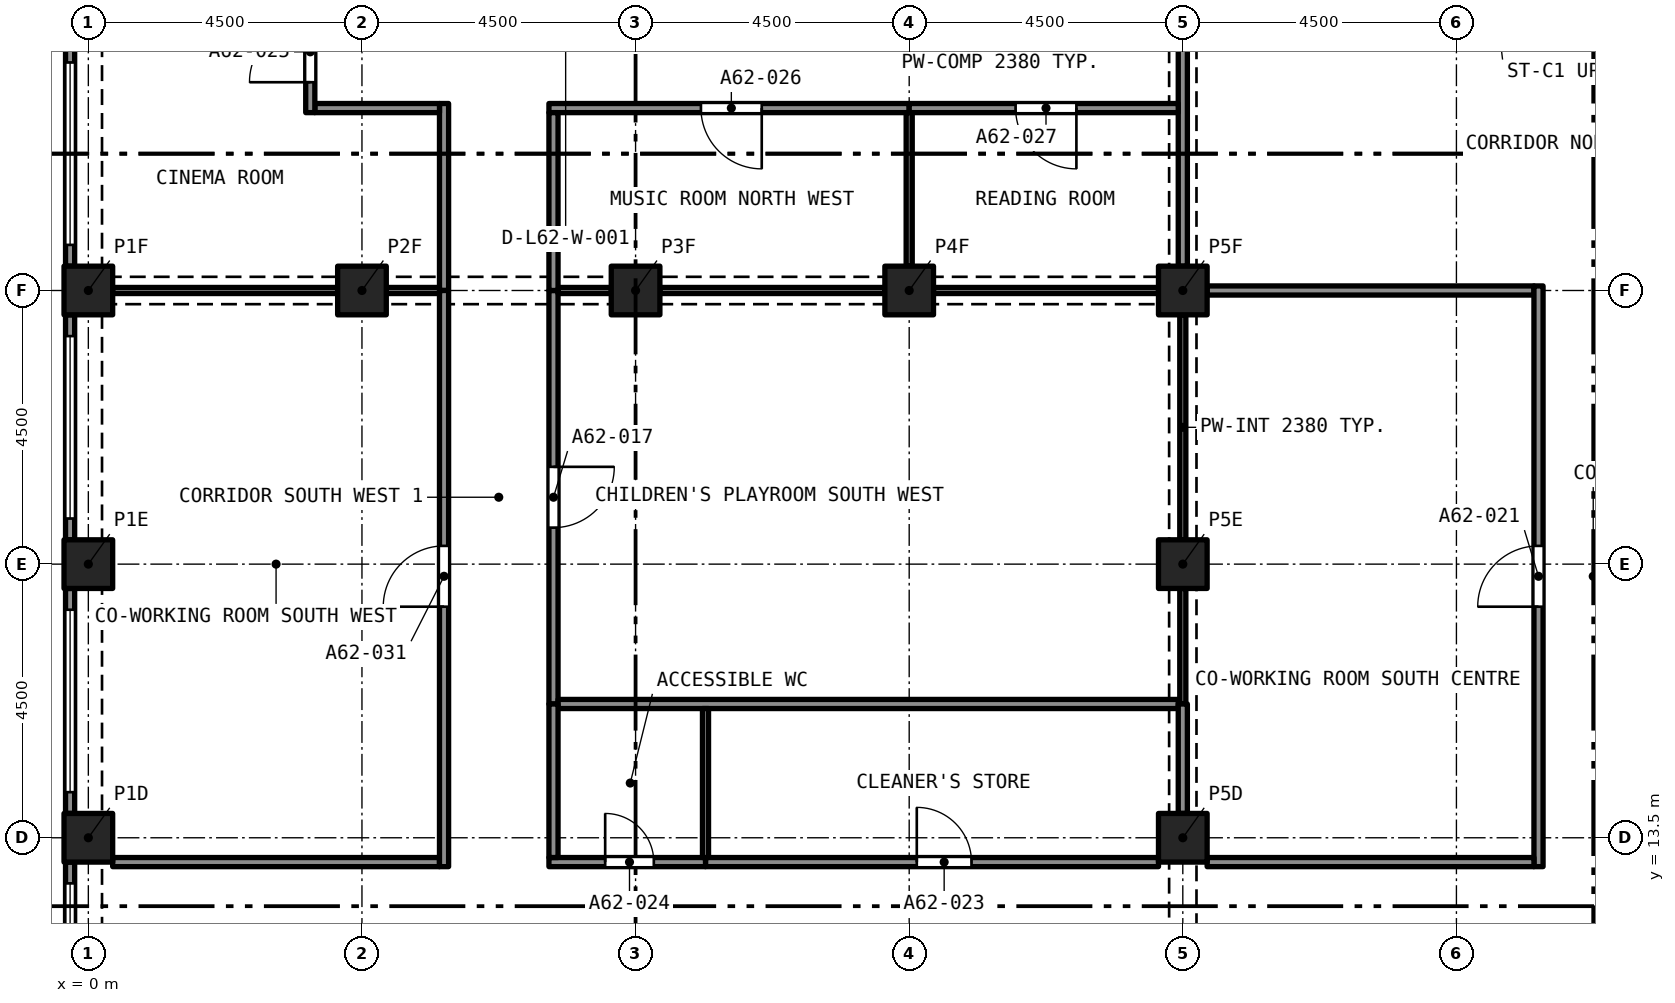
"""IFC4 building model, lengths in metres.
Left out: names, types, materials, properties, quantities, classifications, styles, units other than length and angle.
Written with IfcOpenShell. Run it as: python <this file> out.ifc"""

import sys

from ifc_helpers import new_model, si_unit, direction, frame, frame_2d, origin, origin_2d, place, context, subcontext, project, spatial, rectangle, extrude, element, fill, save


model = new_model("IFC4")
c1 = context("Model", 3, precision=1e-05, world=origin(), true_north=direction((0.0, 1.0)))
c2 = subcontext(c1, "Body", "Model", "MODEL_VIEW")
j1 = project(units=[si_unit("LENGTHUNIT", "METRE"), si_unit("PLANEANGLEUNIT", "RADIAN")], contexts=[c1])
p1 = place(None, origin())
s1 = spatial("IfcSite", under=j1, at=p1, CompositionType="ELEMENT")
p2 = place(p1, origin())
s2 = spatial("IfcBuilding", under=s1, at=p2, CompositionType="ELEMENT")
p3 = place(p2, frame((0.0, 0.0, 222.895)))
s3 = spatial("IfcBuildingStorey", under=s2, at=p3, CompositionType="ELEMENT", Elevation=222.895)
for number, where, z_axis, x_axis in (
    (1, (0.0, 13.5, 0.0), (0.0, 0.0, 1.0), (1.0, 0.0, 0.0)),
    (2, (18.0, 13.5, 0.0), (0.0, 0.0, 1.0), (1.0, 0.0, 0.0)),
    (3, (0.0, 18.0, 0.0), (0.0, 0.0, 1.0), (1.0, 0.0, 0.0)),
    (4, (18.0, 18.0, 0.0), (0.0, 0.0, 1.0), (1.0, 0.0, 0.0)),
    (5, (0.0, 22.5, 0.0), (0.0, 0.0, 1.0), (1.0, 0.0, 0.0)),
    (6, (4.5, 22.5, 0.0), (0.0, 0.0, 1.0), (1.0, 0.0, 0.0)),
    (7, (9.0, 22.5, 0.0), (0.0, 0.0, 1.0), (1.0, 0.0, 0.0)),
    (8, (13.5, 22.5, 0.0), (0.0, 0.0, 1.0), (1.0, 0.0, 0.0)),
    (9, (18.0, 22.5, 0.0), (0.0, 0.0, 1.0), (1.0, 0.0, 0.0)),
):
    element("IfcColumn", number, at=place(p3, frame(where, z_axis=z_axis, x_axis=x_axis)), inside=s3, PredefinedType="COLUMN", context=c2, shape_type="SweptSolid", body=[
        extrude(rectangle(XDim=0.8, YDim=0.8, at=origin_2d()), origin(), (0.0, 0.0, 1.0), 3.2),
    ])
p4 = place(p3, frame((-0.3, 22.9, 0.0), z_axis=(0.0, 0.0, 1.0), x_axis=(0.0, 1.0, 0.0)))
e10 = element("IfcWall", 10, at=p4, inside=s3, PredefinedType="SOLIDWALL", context=c2, shape_type="SweptSolid", body=[
    extrude(rectangle(XDim=3.7, YDim=0.15, at=frame_2d((1.85, 0.0))), origin(), (0.0, 0.0, 1.0), 3.2),
])
p5 = place(p4, frame((0.35, 0.0, 0.45)))
e11 = element("IfcOpeningElement", 11, at=p5, cuts=e10, PredefinedType="OPENING", context=c2, shape_type="SweptSolid", body=[
    extrude(rectangle(XDim=3.0, YDim=1.95, at=frame_2d((1.5, 0.975))), frame((0.0, 0.085, 0.0), z_axis=(0.0, -1.0, 0.0), x_axis=(1.0, 0.0, 0.0)), (0.0, 0.0, 1.0), 0.17),
])
p6 = place(p3, frame((-0.3, 18.4, 0.0), z_axis=(0.0, 0.0, 1.0), x_axis=(0.0, 1.0, 0.0)))
e12 = element("IfcWall", 12, at=p6, inside=s3, PredefinedType="SOLIDWALL", context=c2, shape_type="SweptSolid", body=[
    extrude(rectangle(XDim=3.7, YDim=0.15, at=frame_2d((1.85, 0.0))), origin(), (0.0, 0.0, 1.0), 3.2),
])
p7 = place(p6, frame((0.35, 0.0, 0.45)))
e13 = element("IfcOpeningElement", 13, at=p7, cuts=e12, PredefinedType="OPENING", context=c2, shape_type="SweptSolid", body=[
    extrude(rectangle(XDim=3.0, YDim=1.95, at=frame_2d((1.5, 0.975))), frame((0.0, 0.085, 0.0), z_axis=(0.0, -1.0, 0.0), x_axis=(1.0, 0.0, 0.0)), (0.0, 0.0, 1.0), 0.17),
])
p8 = place(p3, frame((-0.3, 13.9, 0.0), z_axis=(0.0, 0.0, 1.0), x_axis=(0.0, 1.0, 0.0)))
e14 = element("IfcWall", 14, at=p8, inside=s3, PredefinedType="SOLIDWALL", context=c2, shape_type="SweptSolid", body=[
    extrude(rectangle(XDim=3.7, YDim=0.15, at=frame_2d((1.85, 0.0))), origin(), (0.0, 0.0, 1.0), 3.2),
])
p9 = place(p8, frame((0.35, 0.0, 0.45)))
e15 = element("IfcOpeningElement", 15, at=p9, cuts=e14, PredefinedType="OPENING", context=c2, shape_type="SweptSolid", body=[
    extrude(rectangle(XDim=3.0, YDim=1.95, at=frame_2d((1.5, 0.975))), frame((0.0, 0.085, 0.0), z_axis=(0.0, -1.0, 0.0), x_axis=(1.0, 0.0, 0.0)), (0.0, 0.0, 1.0), 0.17),
])
p10 = place(p3, frame((-0.3, 9.4, 0.0), z_axis=(0.0, 0.0, 1.0), x_axis=(0.0, 1.0, 0.0)))
e16 = element("IfcWall", 16, at=p10, inside=s3, PredefinedType="SOLIDWALL", context=c2, shape_type="SweptSolid", body=[
    extrude(rectangle(XDim=3.7, YDim=0.15, at=frame_2d((1.85, 0.0))), origin(), (0.0, 0.0, 1.0), 3.2),
])
p11 = place(p10, frame((0.35, 0.0, 0.45)))
e17 = element("IfcOpeningElement", 17, at=p11, cuts=e16, PredefinedType="OPENING", context=c2, shape_type="SweptSolid", body=[
    extrude(rectangle(XDim=3.0, YDim=1.95, at=frame_2d((1.5, 0.975))), frame((0.0, 0.085, 0.0), z_axis=(0.0, -1.0, 0.0), x_axis=(1.0, 0.0, 0.0)), (0.0, 0.0, 1.0), 0.17),
])
p12 = place(p3, frame((18.0, 18.4, 0.0), z_axis=(0.0, 0.0, 1.0), x_axis=(0.0, 1.0, 0.0)))
e18 = element("IfcWall", 18, at=p12, inside=s3, PredefinedType="PARTITIONING", context=c2, shape_type="SweptSolid", body=[
    extrude(rectangle(XDim=3.7, YDim=0.1, at=frame_2d((1.85, 0.0))), origin(), (0.0, 0.0, 1.0), 2.38),
])
p13 = place(p3, frame((18.0, 15.7, 0.0), z_axis=(0.0, 0.0, 1.0), x_axis=(0.0, 1.0, 0.0)))
e19 = element("IfcWall", 19, at=p13, inside=s3, PredefinedType="PARTITIONING", context=c2, shape_type="SweptSolid", body=[
    extrude(rectangle(XDim=1.9, YDim=0.1, at=frame_2d((0.95, 0.0))), origin(), (0.0, 0.0, 1.0), 2.38),
])
p14 = place(p3, frame((7.65, 22.5, 0.0), z_axis=(0.0, 0.0, 1.0), x_axis=(0.0, -1.0, 0.0)))
e20 = element("IfcWall", 20, at=p14, inside=s3, PredefinedType="PARTITIONING", context=c2, shape_type="SweptSolid", body=[
    extrude(rectangle(XDim=6.8, YDim=0.15, at=frame_2d((3.4, 0.0))), origin(), (0.0, 0.0, 1.0), 2.9),
])
p15 = place(p14, frame((2.9, 0.0, 0.0)))
e21 = element("IfcOpeningElement", 21, at=p15, cuts=e20, PredefinedType="OPENING", context=c2, shape_type="SweptSolid", body=[
    extrude(rectangle(XDim=1.0, YDim=2.1, at=frame_2d((0.5, 1.05))), frame((0.0, 0.085, 0.0), z_axis=(0.0, -1.0, 0.0), x_axis=(1.0, 0.0, 0.0)), (0.0, 0.0, 1.0), 0.17),
])
p16 = place(p3, frame((7.725, 22.5, 0.0), z_axis=(0.0, 0.0, 1.0), x_axis=(1.0, 0.0, 0.0)))
e22 = element("IfcWall", 22, at=p16, inside=s3, PredefinedType="PARTITIONING", context=c2, shape_type="SweptSolid", body=[
    extrude(rectangle(XDim=0.875, YDim=0.1, at=frame_2d((0.438, 0.0))), origin(), (0.0, 0.0, 1.0), 2.38),
])
for number, where, z_axis, x_axis in (
    (23, (9.4, 22.5, 0.0), (0.0, 0.0, 1.0), (1.0, 0.0, 0.0)),
    (24, (13.9, 22.5, 0.0), (0.0, 0.0, 1.0), (1.0, 0.0, 0.0)),
):
    element("IfcWall", number, at=place(p3, frame(where, z_axis=z_axis, x_axis=x_axis)), inside=s3, PredefinedType="PARTITIONING", context=c2, shape_type="SweptSolid", body=[
        extrude(rectangle(XDim=3.7, YDim=0.1, at=frame_2d((1.85, 0.0))), origin(), (0.0, 0.0, 1.0), 2.38),
    ])
p17 = place(p3, frame((7.725, 15.7, 0.0), z_axis=(0.0, 0.0, 1.0), x_axis=(1.0, 0.0, 0.0)))
e25 = element("IfcWall", 25, at=p17, inside=s3, PredefinedType="PARTITIONING", context=c2, shape_type="SweptSolid", body=[
    extrude(rectangle(XDim=10.2, YDim=0.15, at=frame_2d((5.1, 0.0))), origin(), (0.0, 0.0, 1.0), 2.9),
])
p18 = place(p3, frame((18.4, 22.5, 0.0), z_axis=(0.0, 0.0, 1.0), x_axis=(1.0, 0.0, 0.0)))
e26 = element("IfcWall", 26, at=p18, inside=s3, PredefinedType="PARTITIONING", context=c2, shape_type="SweptSolid", body=[
    extrude(rectangle(XDim=5.375, YDim=0.15, at=frame_2d((2.688, 0.0))), origin(), (0.0, 0.0, 1.0), 2.75),
])
p19 = place(p3, frame((18.0, 22.9, 0.0), z_axis=(0.0, 0.0, 1.0), x_axis=(0.0, 1.0, 0.0)))
e27 = element("IfcWall", 27, at=p19, inside=s3, PredefinedType="PARTITIONING", context=c2, shape_type="SweptSolid", body=[
    extrude(rectangle(XDim=3.7, YDim=0.15, at=frame_2d((1.85, 0.0))), origin(), (0.0, 0.0, 1.0), 2.38),
])
p20 = place(p3, frame((23.85, 13.025, 0.0), z_axis=(0.0, 0.0, 1.0), x_axis=(0.0, 1.0, 0.0)))
e28 = element("IfcWall", 28, at=p20, inside=s3, PredefinedType="PARTITIONING", context=c2, shape_type="SweptSolid", body=[
    extrude(rectangle(XDim=9.55, YDim=0.15, at=frame_2d((4.775, 0.0))), origin(), (0.0, 0.0, 1.0), 2.75),
])
p21 = place(p20, frame((4.275, 0.0, 0.0)))
e29 = element("IfcOpeningElement", 29, at=p21, cuts=e28, PredefinedType="OPENING", context=c2, shape_type="SweptSolid", body=[
    extrude(rectangle(XDim=1.0, YDim=2.1, at=frame_2d((0.5, 1.05))), frame((0.0, 0.085, 0.0), z_axis=(0.0, -1.0, 0.0), x_axis=(1.0, 0.0, 0.0)), (0.0, 0.0, 1.0), 0.17),
])
p22 = place(p3, frame((18.4, 13.1, 0.0), z_axis=(0.0, 0.0, 1.0), x_axis=(1.0, 0.0, 0.0)))
e30 = element("IfcWall", 30, at=p22, inside=s3, PredefinedType="PARTITIONING", context=c2, shape_type="SweptSolid", body=[
    extrude(rectangle(XDim=5.375, YDim=0.15, at=frame_2d((2.688, 0.0))), origin(), (0.0, 0.0, 1.0), 2.75),
])
p23 = place(p3, frame((10.15, 13.1, 0.0), z_axis=(0.0, 0.0, 1.0), x_axis=(1.0, 0.0, 0.0)))
e31 = element("IfcWall", 31, at=p23, inside=s3, PredefinedType="PARTITIONING", context=c2, shape_type="SweptSolid", body=[
    extrude(rectangle(XDim=7.45, YDim=0.15, at=frame_2d((3.725, 0.0))), origin(), (0.0, 0.0, 1.0), 2.9),
])
p24 = place(p23, frame((3.475, 0.0, 0.0)))
e32 = element("IfcOpeningElement", 32, at=p24, cuts=e31, PredefinedType="OPENING", context=c2, shape_type="SweptSolid", body=[
    extrude(rectangle(XDim=0.9, YDim=2.1, at=frame_2d((0.45, 1.05))), frame((0.0, 0.085, 0.0), z_axis=(0.0, -1.0, 0.0), x_axis=(1.0, 0.0, 0.0)), (0.0, 0.0, 1.0), 0.17),
])
p25 = place(p3, frame((7.575, 13.1, 0.0), z_axis=(0.0, 0.0, 1.0), x_axis=(1.0, 0.0, 0.0)))
e33 = element("IfcWall", 33, at=p25, inside=s3, PredefinedType="PARTITIONING", context=c2, shape_type="SweptSolid", body=[
    extrude(rectangle(XDim=2.575, YDim=0.15, at=frame_2d((1.288, 0.0))), origin(), (0.0, 0.0, 1.0), 2.9),
])
p26 = place(p25, frame((0.925, 0.0, 0.0)))
e34 = element("IfcOpeningElement", 34, at=p26, cuts=e33, PredefinedType="OPENING", context=c2, shape_type="SweptSolid", body=[
    extrude(rectangle(XDim=0.8, YDim=2.1, at=frame_2d((0.4, 1.05))), frame((0.0, 0.085, 0.0), z_axis=(0.0, -1.0, 0.0), x_axis=(1.0, 0.0, 0.0)), (0.0, 0.0, 1.0), 0.17),
])
p27 = place(p3, frame((0.4, 13.1, 0.0), z_axis=(0.0, 0.0, 1.0), x_axis=(1.0, 0.0, 0.0)))
e35 = element("IfcWall", 35, at=p27, inside=s3, PredefinedType="PARTITIONING", context=c2, shape_type="SweptSolid", body=[
    extrude(rectangle(XDim=5.375, YDim=0.15, at=frame_2d((2.688, 0.0))), origin(), (0.0, 0.0, 1.0), 2.9),
])
p28 = place(p3, frame((18.0, 13.9, 0.0), z_axis=(0.0, 0.0, 1.0), x_axis=(0.0, 1.0, 0.0)))
e36 = element("IfcWall", 36, at=p28, inside=s3, PredefinedType="PARTITIONING", context=c2, shape_type="SweptSolid", body=[
    extrude(rectangle(XDim=1.8, YDim=0.15, at=frame_2d((0.9, 0.0))), origin(), (0.0, 0.0, 1.0), 2.38),
])
p29 = place(p3, frame((5.85, 22.5, 0.0), z_axis=(0.0, 0.0, 1.0), x_axis=(0.0, 1.0, 0.0)))
e37 = element("IfcWall", 37, at=p29, inside=s3, PredefinedType="PARTITIONING", context=c2, shape_type="SweptSolid", body=[
    extrude(rectangle(XDim=3.075, YDim=0.15, at=frame_2d((1.538, 0.0))), origin(), (0.0, 0.0, 1.0), 2.9),
])
p30 = place(p3, frame((3.725, 25.5, 0.0), z_axis=(0.0, 0.0, 1.0), x_axis=(1.0, 0.0, 0.0)))
e38 = element("IfcWall", 38, at=p30, inside=s3, PredefinedType="PARTITIONING", context=c2, shape_type="SweptSolid", body=[
    extrude(rectangle(XDim=2.05, YDim=0.15, at=frame_2d((1.025, 0.0))), origin(), (0.0, 0.0, 1.0), 2.9),
])
p31 = place(p3, frame((3.65, 25.425, 0.0), z_axis=(0.0, 0.0, 1.0), x_axis=(0.0, 1.0, 0.0)))
e39 = element("IfcWall", 39, at=p31, inside=s3, PredefinedType="PARTITIONING", context=c2, shape_type="SweptSolid", body=[
    extrude(rectangle(XDim=1.925, YDim=0.15, at=frame_2d((0.962, 0.0))), origin(), (0.0, 0.0, 1.0), 2.9),
])
p32 = place(p31, frame((0.5, 0.0, 0.0)))
e40 = element("IfcOpeningElement", 40, at=p32, cuts=e39, PredefinedType="OPENING", context=c2, shape_type="SweptSolid", body=[
    extrude(rectangle(XDim=1.0, YDim=2.1, at=frame_2d((0.5, 1.05))), frame((0.0, 0.085, 0.0), z_axis=(0.0, -1.0, 0.0), x_axis=(1.0, 0.0, 0.0)), (0.0, 0.0, 1.0), 0.17),
])
p33 = place(p3, frame((13.5, 25.5, 0.0), z_axis=(0.0, 0.0, 1.0), x_axis=(-1.0, 0.0, 0.0)))
e41 = element("IfcWall", 41, at=p33, inside=s3, PredefinedType="PARTITIONING", context=c2, shape_type="SweptSolid", body=[
    extrude(rectangle(XDim=5.925, YDim=0.15, at=frame_2d((2.962, 0.0))), origin(), (0.0, 0.0, 1.0), 2.9),
])
p34 = place(p33, frame((2.425, 0.0, 0.0)))
e42 = element("IfcOpeningElement", 42, at=p34, cuts=e41, PredefinedType="OPENING", context=c2, shape_type="SweptSolid", body=[
    extrude(rectangle(XDim=1.0, YDim=2.1, at=frame_2d((0.5, 1.05))), frame((0.0, 0.085, 0.0), z_axis=(0.0, -1.0, 0.0), x_axis=(1.0, 0.0, 0.0)), (0.0, 0.0, 1.0), 0.17),
])
p35 = place(p3, frame((7.65, 22.5, 0.0), z_axis=(0.0, 0.0, 1.0), x_axis=(0.0, 1.0, 0.0)))
e43 = element("IfcWall", 43, at=p35, inside=s3, PredefinedType="PARTITIONING", context=c2, shape_type="SweptSolid", body=[
    extrude(rectangle(XDim=2.925, YDim=0.15, at=frame_2d((1.462, 0.0))), origin(), (0.0, 0.0, 1.0), 2.9),
])
p36 = place(p3, frame((17.925, 25.5, 0.0), z_axis=(0.0, 0.0, 1.0), x_axis=(-1.0, 0.0, 0.0)))
e44 = element("IfcWall", 44, at=p36, inside=s3, PredefinedType="PARTITIONING", context=c2, shape_type="SweptSolid", body=[
    extrude(rectangle(XDim=4.425, YDim=0.15, at=frame_2d((2.212, 0.0))), origin(), (0.0, 0.0, 1.0), 2.9),
])
p37 = place(p36, frame((1.675, 0.0, 0.0)))
e45 = element("IfcOpeningElement", 45, at=p37, cuts=e44, PredefinedType="OPENING", context=c2, shape_type="SweptSolid", body=[
    extrude(rectangle(XDim=1.0, YDim=2.1, at=frame_2d((0.5, 1.05))), frame((0.0, 0.085, 0.0), z_axis=(0.0, -1.0, 0.0), x_axis=(1.0, 0.0, 0.0)), (0.0, 0.0, 1.0), 0.17),
])
p38 = place(p3, frame((7.65, 13.175, 0.0), z_axis=(0.0, 0.0, 1.0), x_axis=(0.0, 1.0, 0.0)))
e46 = element("IfcWall", 46, at=p38, inside=s3, PredefinedType="PARTITIONING", context=c2, shape_type="SweptSolid", body=[
    extrude(rectangle(XDim=2.525, YDim=0.15, at=frame_2d((1.262, 0.0))), origin(), (0.0, 0.0, 1.0), 2.9),
])
p39 = place(p3, frame((5.85, 13.025, 0.0), z_axis=(0.0, 0.0, 1.0), x_axis=(0.0, 1.0, 0.0)))
e47 = element("IfcWall", 47, at=p39, inside=s3, PredefinedType="PARTITIONING", context=c2, shape_type="SweptSolid", body=[
    extrude(rectangle(XDim=9.475, YDim=0.15, at=frame_2d((4.738, 0.0))), origin(), (0.0, 0.0, 1.0), 2.9),
])
p40 = place(p39, frame((4.275, 0.0, 0.0)))
e48 = element("IfcOpeningElement", 48, at=p40, cuts=e47, PredefinedType="OPENING", context=c2, shape_type="SweptSolid", body=[
    extrude(rectangle(XDim=1.0, YDim=2.1, at=frame_2d((0.5, 1.05))), frame((0.0, 0.085, 0.0), z_axis=(0.0, -1.0, 0.0), x_axis=(1.0, 0.0, 0.0)), (0.0, 0.0, 1.0), 0.17),
])
p41 = place(p3, frame((4.9, 22.5, 0.0), z_axis=(0.0, 0.0, 1.0), x_axis=(1.0, 0.0, 0.0)))
e49 = element("IfcWall", 49, at=p41, inside=s3, PredefinedType="PARTITIONING", context=c2, shape_type="SweptSolid", body=[
    extrude(rectangle(XDim=0.875, YDim=0.1, at=frame_2d((0.438, 0.0))), origin(), (0.0, 0.0, 1.0), 2.38),
])
p42 = place(p3, frame((0.4, 22.5, 0.0), z_axis=(0.0, 0.0, 1.0), x_axis=(1.0, 0.0, 0.0)))
e50 = element("IfcWall", 50, at=p42, inside=s3, PredefinedType="PARTITIONING", context=c2, shape_type="SweptSolid", body=[
    extrude(rectangle(XDim=3.7, YDim=0.1, at=frame_2d((1.85, 0.0))), origin(), (0.0, 0.0, 1.0), 2.38),
])
p43 = place(p3, frame((13.5, 22.9, 0.0), z_axis=(0.0, 0.0, 1.0), x_axis=(0.0, 1.0, 0.0)))
e51 = element("IfcWall", 51, at=p43, inside=s3, PredefinedType="PARTITIONING", context=c2, shape_type="SweptSolid", body=[
    extrude(rectangle(XDim=2.525, YDim=0.1, at=frame_2d((1.263, 0.0))), origin(), (0.0, 0.0, 1.0), 2.9),
])
p44 = place(p3, frame((10.15, 13.175, 0.0), z_axis=(0.0, 0.0, 1.0), x_axis=(0.0, 1.0, 0.0)))
e52 = element("IfcWall", 52, at=p44, inside=s3, PredefinedType="PARTITIONING", context=c2, shape_type="SweptSolid", body=[
    extrude(rectangle(XDim=2.45, YDim=0.1, at=frame_2d((1.225, 0.0))), origin(), (0.0, 0.0, 1.0), 2.9),
])
p45 = place(p5, origin())
e53 = element("IfcWindow", 53, at=p45, inside=s3, PartitioningType="SINGLE_PANEL", PredefinedType="WINDOW", context=c2, shape_type="SweptSolid", body=[
    extrude(rectangle(XDim=3.0, YDim=1.95, at=frame_2d((1.5, 0.975))), frame((0.0, 0.03, 0.0), z_axis=(0.0, -1.0, 0.0), x_axis=(1.0, 0.0, 0.0)), (0.0, 0.0, 1.0), 0.06),
])
fill(e11, e53)
p46 = place(p7, origin())
e54 = element("IfcWindow", 54, at=p46, inside=s3, PartitioningType="SINGLE_PANEL", PredefinedType="WINDOW", context=c2, shape_type="SweptSolid", body=[
    extrude(rectangle(XDim=3.0, YDim=1.95, at=frame_2d((1.5, 0.975))), frame((0.0, 0.03, 0.0), z_axis=(0.0, -1.0, 0.0), x_axis=(1.0, 0.0, 0.0)), (0.0, 0.0, 1.0), 0.06),
])
fill(e13, e54)
p47 = place(p9, origin())
e55 = element("IfcWindow", 55, at=p47, inside=s3, PartitioningType="SINGLE_PANEL", PredefinedType="WINDOW", context=c2, shape_type="SweptSolid", body=[
    extrude(rectangle(XDim=3.0, YDim=1.95, at=frame_2d((1.5, 0.975))), frame((0.0, 0.03, 0.0), z_axis=(0.0, -1.0, 0.0), x_axis=(1.0, 0.0, 0.0)), (0.0, 0.0, 1.0), 0.06),
])
fill(e15, e55)
p48 = place(p11, origin())
e56 = element("IfcWindow", 56, at=p48, inside=s3, PartitioningType="SINGLE_PANEL", PredefinedType="WINDOW", context=c2, shape_type="SweptSolid", body=[
    extrude(rectangle(XDim=3.0, YDim=1.95, at=frame_2d((1.5, 0.975))), frame((0.0, 0.03, 0.0), z_axis=(0.0, -1.0, 0.0), x_axis=(1.0, 0.0, 0.0)), (0.0, 0.0, 1.0), 0.06),
])
fill(e17, e56)
p49 = place(p15, origin())
e57 = element("IfcDoor", 57, at=p49, inside=s3, OperationType="SINGLE_SWING_LEFT", PredefinedType="DOOR", context=c2, shape_type="SweptSolid", body=[
    extrude(rectangle(XDim=1.0, YDim=2.1, at=frame_2d((0.5, 1.05))), frame((0.0, 0.025, 0.0), z_axis=(0.0, -1.0, 0.0), x_axis=(1.0, 0.0, 0.0)), (0.0, 0.0, 1.0), 0.05),
])
fill(e21, e57)
p50 = place(p21, origin())
e58 = element("IfcDoor", 58, at=p50, inside=s3, OperationType="SINGLE_SWING_RIGHT", PredefinedType="DOOR", context=c2, shape_type="SweptSolid", body=[
    extrude(rectangle(XDim=1.0, YDim=2.1, at=frame_2d((0.5, 1.05))), frame((0.0, 0.025, 0.0), z_axis=(0.0, -1.0, 0.0), x_axis=(1.0, 0.0, 0.0)), (0.0, 0.0, 1.0), 0.05),
])
fill(e29, e58)
p51 = place(p24, origin())
e59 = element("IfcDoor", 59, at=p51, inside=s3, OperationType="SINGLE_SWING_RIGHT", PredefinedType="DOOR", context=c2, shape_type="SweptSolid", body=[
    extrude(rectangle(XDim=0.9, YDim=2.1, at=frame_2d((0.45, 1.05))), frame((0.0, 0.025, 0.0), z_axis=(0.0, -1.0, 0.0), x_axis=(1.0, 0.0, 0.0)), (0.0, 0.0, 1.0), 0.05),
])
fill(e32, e59)
p52 = place(p26, origin())
e60 = element("IfcDoor", 60, at=p52, inside=s3, OperationType="SINGLE_SWING_RIGHT", PredefinedType="DOOR", context=c2, shape_type="SweptSolid", body=[
    extrude(rectangle(XDim=0.8, YDim=2.1, at=frame_2d((0.4, 1.05))), frame((0.0, 0.025, 0.0), z_axis=(0.0, -1.0, 0.0), x_axis=(1.0, 0.0, 0.0)), (0.0, 0.0, 1.0), 0.05),
])
fill(e34, e60)
p53 = place(p32, origin())
e61 = element("IfcDoor", 61, at=p53, inside=s3, OperationType="SINGLE_SWING_RIGHT", PredefinedType="DOOR", context=c2, shape_type="SweptSolid", body=[
    extrude(rectangle(XDim=1.0, YDim=2.1, at=frame_2d((0.5, 1.05))), frame((0.0, 0.025, 0.0), z_axis=(0.0, -1.0, 0.0), x_axis=(1.0, 0.0, 0.0)), (0.0, 0.0, 1.0), 0.05),
])
fill(e40, e61)
p54 = place(p34, origin())
e62 = element("IfcDoor", 62, at=p54, inside=s3, OperationType="SINGLE_SWING_LEFT", PredefinedType="DOOR", context=c2, shape_type="SweptSolid", body=[
    extrude(rectangle(XDim=1.0, YDim=2.1, at=frame_2d((0.5, 1.05))), frame((0.0, 0.025, 0.0), z_axis=(0.0, -1.0, 0.0), x_axis=(1.0, 0.0, 0.0)), (0.0, 0.0, 1.0), 0.05),
])
fill(e42, e62)
p55 = place(p37, origin())
e63 = element("IfcDoor", 63, at=p55, inside=s3, OperationType="SINGLE_SWING_LEFT", PredefinedType="DOOR", context=c2, shape_type="SweptSolid", body=[
    extrude(rectangle(XDim=1.0, YDim=2.1, at=frame_2d((0.5, 1.05))), frame((0.0, 0.025, 0.0), z_axis=(0.0, -1.0, 0.0), x_axis=(1.0, 0.0, 0.0)), (0.0, 0.0, 1.0), 0.05),
])
fill(e45, e63)
p56 = place(p40, origin())
e64 = element("IfcDoor", 64, at=p56, inside=s3, OperationType="SINGLE_SWING_RIGHT", PredefinedType="DOOR", context=c2, shape_type="SweptSolid", body=[
    extrude(rectangle(XDim=1.0, YDim=2.1, at=frame_2d((0.5, 1.05))), frame((0.0, 0.025, 0.0), z_axis=(0.0, -1.0, 0.0), x_axis=(1.0, 0.0, 0.0)), (0.0, 0.0, 1.0), 0.05),
])
fill(e48, e64)
save(model, sys.argv[1])
